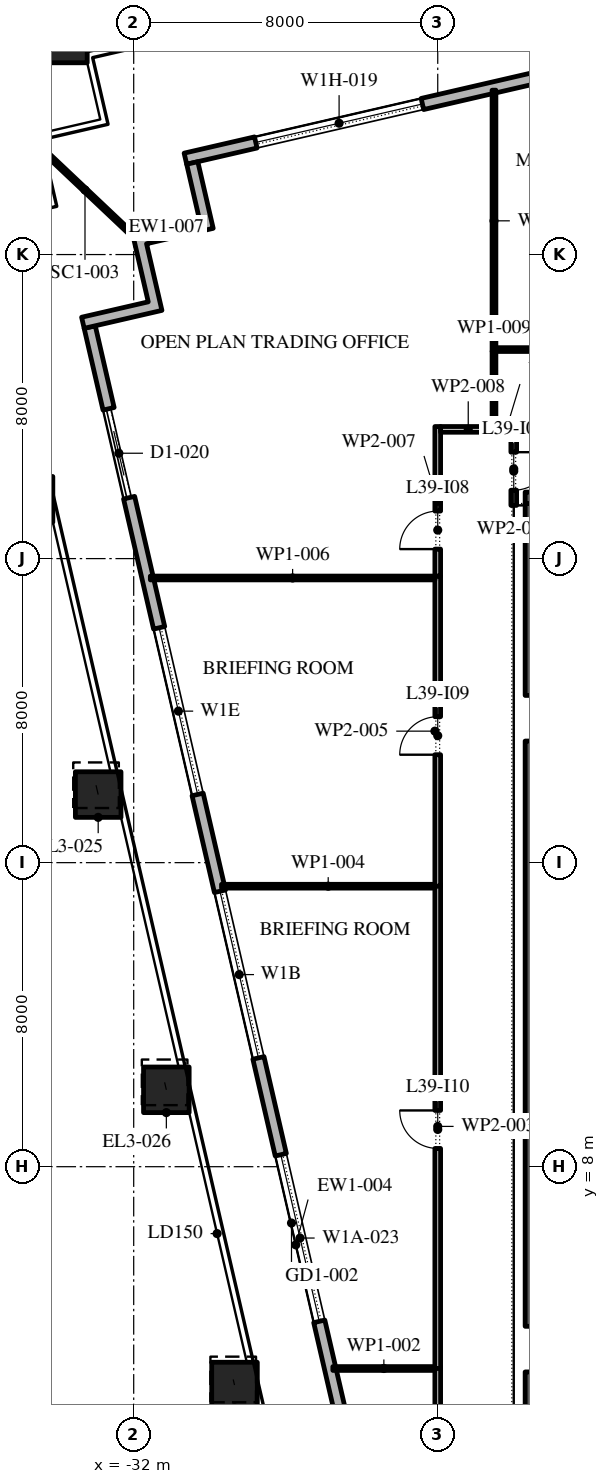
"""IFC4 building model, lengths in metres.
Left out: names, types, materials, properties, quantities, classifications, styles, units other than length and angle.
Written with IfcOpenShell. Run it as: python <this file> out.ifc"""

import sys

from ifc_helpers import new_model, si_unit, direction, frame, frame_2d, origin, origin_2d, place, context, subcontext, project, spatial, polyline, rectangle, outline, extrude, element, fill, save


model = new_model("IFC4")
c1 = context("Model", 3, precision=1e-05, world=origin(), true_north=direction((0.0, 1.0)))
c2 = subcontext(c1, "Body", "Model", "MODEL_VIEW")
j1 = project(units=[si_unit("LENGTHUNIT", "METRE"), si_unit("PLANEANGLEUNIT", "RADIAN")], contexts=[c1])
p1 = place(None, origin())
s1 = spatial("IfcSite", under=j1, at=p1, CompositionType="ELEMENT")
p2 = place(p1, origin())
s2 = spatial("IfcBuilding", under=s1, at=p2, CompositionType="ELEMENT")
p3 = place(p2, frame((0.0, 0.0, 180.0)))
s3 = spatial("IfcBuildingStorey", under=s2, at=p3, CompositionType="ELEMENT", Elevation=180.0)
p4 = place(p3, frame((-33.823, 37.646, 0.0), z_axis=(-0.018825755928, 0.08155896722, 0.996490705315), x_axis=(-0.974379530941, -0.22491004798, 0.0)))
e1 = element("IfcColumn", 1, at=p4, inside=s3, PredefinedType="COLUMN", context=c2, shape_type="SweptSolid", body=[
    extrude(rectangle(XDim=1.2, YDim=1.2, at=origin_2d()), origin(), (0.0, 0.0, 1.0), 4.215),
])
p5 = place(p3, frame((-34.728, 25.56, 0.0), z_axis=(-0.016176212764, 0.069980963462, 0.99741716192), x_axis=(-0.974309502923, -0.225213215672, 0.0)))
e2 = element("IfcColumn", 2, at=p5, inside=s3, PredefinedType="COLUMN", context=c2, shape_type="SweptSolid", body=[
    extrude(rectangle(XDim=1.2, YDim=1.2, at=origin_2d()), origin(), (0.0, 0.0, 1.0), 4.211),
])
p6 = place(p3, frame((-32.934, 17.791, 0.0), z_axis=(-0.013519768466, 0.058430930665, 0.998199900923), x_axis=(-0.974260583886, -0.225424742845, 0.0)))
e3 = element("IfcColumn", 3, at=p6, inside=s3, PredefinedType="COLUMN", context=c2, shape_type="SweptSolid", body=[
    extrude(rectangle(XDim=1.2, YDim=1.2, at=origin_2d()), origin(), (0.0, 0.0, 1.0), 4.208),
])
p7 = place(p3, frame((-31.141, 10.023, 0.0), z_axis=(-0.010799619665, 0.046740289408, 0.998848694028), x_axis=(-0.974329962248, -0.225124686929, 0.0)))
e4 = element("IfcColumn", 4, at=p7, inside=s3, PredefinedType="COLUMN", context=c2, shape_type="SweptSolid", body=[
    extrude(rectangle(XDim=1.2, YDim=1.2, at=origin_2d()), origin(), (0.0, 0.0, 1.0), 4.205),
])
p8 = place(p3, frame((-29.347, 2.254, 0.0), z_axis=(-0.008074763646, 0.035029370347, 0.999353661826), x_axis=(-0.974445638882, -0.224623455729, 0.0)))
e5 = element("IfcColumn", 5, at=p8, inside=s3, PredefinedType="COLUMN", context=c2, shape_type="SweptSolid", body=[
    extrude(rectangle(XDim=1.2, YDim=1.2, at=origin_2d()), origin(), (0.0, 0.0, 1.0), 4.203),
])
p9 = place(p3, frame((17.592, 45.657, 0.0), z_axis=(0.0, 0.0, 1.0), x_axis=(-0.974370243697, -0.224950279389, 0.0)))
e6 = element("IfcWall", 6, at=p9, inside=s3, PredefinedType="STANDARD", context=c2, shape_type="SweptSolid", body=[
    extrude(rectangle(XDim=49.5, YDim=0.3, at=frame_2d((24.75, 0.0))), origin(), (0.0, 0.0, 1.0), 4.0),
])
p10 = place(p9, frame((2.8, 0.0, 0.0)))
e7 = element("IfcOpeningElement", 7, at=p10, cuts=e6, PredefinedType="OPENING", context=c2, shape_type="SweptSolid", body=[
    extrude(rectangle(XDim=2.4, YDim=3.5, at=frame_2d((1.2, 1.75))), frame((0.0, 0.16, 0.0), z_axis=(0.0, -1.0, 0.0), x_axis=(1.0, 0.0, 0.0)), (0.0, 0.0, 1.0), 0.32),
])
p11 = place(p9, frame((9.9, 0.0, 0.45)))
e8 = element("IfcOpeningElement", 8, at=p11, cuts=e6, PredefinedType="OPENING", context=c2, shape_type="SweptSolid", body=[
    extrude(rectangle(XDim=4.5, YDim=2.45, at=frame_2d((2.25, 1.225))), frame((0.0, 0.16, 0.0), z_axis=(0.0, -1.0, 0.0), x_axis=(1.0, 0.0, 0.0)), (0.0, 0.0, 1.0), 0.32),
])
p12 = place(p9, frame((18.2, 0.0, 0.45)))
e9 = element("IfcOpeningElement", 9, at=p12, cuts=e6, PredefinedType="OPENING", context=c2, shape_type="SweptSolid", body=[
    extrude(rectangle(XDim=4.5, YDim=2.45, at=frame_2d((2.25, 1.225))), frame((0.0, 0.16, 0.0), z_axis=(0.0, -1.0, 0.0), x_axis=(1.0, 0.0, 0.0)), (0.0, 0.0, 1.0), 0.32),
])
p13 = place(p9, frame((26.5, 0.0, 0.45)))
e10 = element("IfcOpeningElement", 10, at=p13, cuts=e6, PredefinedType="OPENING", context=c2, shape_type="SweptSolid", body=[
    extrude(rectangle(XDim=4.5, YDim=2.575, at=frame_2d((2.25, 1.288))), frame((0.0, 0.16, 0.0), z_axis=(0.0, -1.0, 0.0), x_axis=(1.0, 0.0, 0.0)), (0.0, 0.0, 1.0), 0.32),
])
p14 = place(p9, frame((35.85, 0.0, 0.0)))
e11 = element("IfcOpeningElement", 11, at=p14, cuts=e6, PredefinedType="OPENING", context=c2, shape_type="SweptSolid", body=[
    extrude(rectangle(XDim=2.4, YDim=3.5, at=frame_2d((1.2, 1.75))), frame((0.0, 0.16, 0.0), z_axis=(0.0, -1.0, 0.0), x_axis=(1.0, 0.0, 0.0)), (0.0, 0.0, 1.0), 0.32),
])
p15 = place(p9, frame((43.1, 0.0, 0.45)))
e12 = element("IfcOpeningElement", 12, at=p15, cuts=e6, PredefinedType="OPENING", context=c2, shape_type="SweptSolid", body=[
    extrude(rectangle(XDim=4.5, YDim=2.75, at=frame_2d((2.25, 1.375))), frame((0.0, 0.16, 0.0), z_axis=(0.0, -1.0, 0.0), x_axis=(1.0, 0.0, 0.0)), (0.0, 0.0, 1.0), 0.32),
])
p16 = place(p3, frame((-33.157, 30.092, 0.0), z_axis=(0.0, 0.0, 1.0), x_axis=(0.224950279389, -0.974370243697, 0.0)))
e13 = element("IfcWall", 13, at=p16, inside=s3, PredefinedType="STANDARD", context=c2, shape_type="SweptSolid", body=[
    extrude(rectangle(XDim=49.5, YDim=0.3, at=frame_2d((24.75, 0.0))), origin(), (0.0, 0.0, 1.0), 4.0),
])
p17 = place(p16, frame((2.207, 0.0, 0.0)))
e14 = element("IfcOpeningElement", 14, at=p17, cuts=e13, PredefinedType="OPENING", context=c2, shape_type="SweptSolid", body=[
    extrude(rectangle(XDim=2.4, YDim=3.5, at=frame_2d((1.2, 1.75))), frame((0.0, 0.16, 0.0), z_axis=(0.0, -1.0, 0.0), x_axis=(1.0, 0.0, 0.0)), (0.0, 0.0, 1.0), 0.32),
])
p18 = place(p16, frame((8.121, 0.0, 0.45)))
e15 = element("IfcOpeningElement", 15, at=p18, cuts=e13, PredefinedType="OPENING", context=c2, shape_type="SweptSolid", body=[
    extrude(rectangle(XDim=4.5, YDim=2.825, at=frame_2d((2.25, 1.413))), frame((0.0, 0.16, 0.0), z_axis=(0.0, -1.0, 0.0), x_axis=(1.0, 0.0, 0.0)), (0.0, 0.0, 1.0), 0.32),
])
p19 = place(p16, frame((15.236, 0.0, 0.45)))
e16 = element("IfcOpeningElement", 16, at=p19, cuts=e13, PredefinedType="OPENING", context=c2, shape_type="SweptSolid", body=[
    extrude(rectangle(XDim=4.5, YDim=2.95, at=frame_2d((2.25, 1.475))), frame((0.0, 0.16, 0.0), z_axis=(0.0, -1.0, 0.0), x_axis=(1.0, 0.0, 0.0)), (0.0, 0.0, 1.0), 0.32),
])
p20 = place(p16, frame((22.35, 0.0, 0.45)))
e17 = element("IfcOpeningElement", 17, at=p20, cuts=e13, PredefinedType="OPENING", context=c2, shape_type="SweptSolid", body=[
    extrude(rectangle(XDim=4.5, YDim=3.0, at=frame_2d((2.25, 1.5))), frame((0.0, 0.16, 0.0), z_axis=(0.0, -1.0, 0.0), x_axis=(1.0, 0.0, 0.0)), (0.0, 0.0, 1.0), 0.32),
])
p21 = place(p16, frame((30.514, 0.0, 0.0)))
e18 = element("IfcOpeningElement", 18, at=p21, cuts=e13, PredefinedType="OPENING", context=c2, shape_type="SweptSolid", body=[
    extrude(rectangle(XDim=2.4, YDim=3.5, at=frame_2d((1.2, 1.75))), frame((0.0, 0.16, 0.0), z_axis=(0.0, -1.0, 0.0), x_axis=(1.0, 0.0, 0.0)), (0.0, 0.0, 1.0), 0.32),
])
p22 = place(p16, frame((36.579, 0.0, 0.45)))
e19 = element("IfcOpeningElement", 19, at=p22, cuts=e13, PredefinedType="OPENING", context=c2, shape_type="SweptSolid", body=[
    extrude(rectangle(XDim=4.5, YDim=3.05, at=frame_2d((2.25, 1.525))), frame((0.0, 0.16, 0.0), z_axis=(0.0, -1.0, 0.0), x_axis=(1.0, 0.0, 0.0)), (0.0, 0.0, 1.0), 0.32),
])
p23 = place(p16, frame((43.693, 0.0, 0.45)))
e20 = element("IfcOpeningElement", 20, at=p23, cuts=e13, PredefinedType="OPENING", context=c2, shape_type="SweptSolid", body=[
    extrude(rectangle(XDim=4.5, YDim=3.05, at=frame_2d((2.25, 1.525))), frame((0.0, 0.16, 0.0), z_axis=(0.0, -1.0, 0.0), x_axis=(1.0, 0.0, 0.0)), (0.0, 0.0, 1.0), 0.32),
])
p24 = place(p3, origin())
e21 = element("IfcWall", 21, at=p24, inside=s3, PredefinedType="STANDARD", context=c2, shape_type="SweptSolid", body=[
    extrude(outline(polyline([(-31.617, 30.756), (-32.022, 32.51), (-30.268, 32.914), (-30.605, 34.376), (-30.313, 34.443), (-29.908, 32.69), (-31.662, 32.285), (-31.257, 30.531), (-33.303, 30.058), (-33.371, 30.351), (-31.617, 30.756)])), origin(), (0.0, 0.0, 1.0), 4.0),
])
p25 = place(p3, frame((-32.022, 32.51, -0.05), z_axis=(0.0, 0.0, 1.0), x_axis=(-0.726757236711, 0.686894401555, 0.0)))
e22 = element("IfcWall", 22, at=p25, inside=s3, PredefinedType="STANDARD", context=c2, shape_type="SweptSolid", body=[
    extrude(rectangle(XDim=3.467, YDim=0.1, at=frame_2d((1.733, 0.0))), origin(), (0.0, 0.0, 1.0), 4.05),
])
p26 = place(p3, frame((-21.35, -2.45, 0.0), z_axis=(0.0, 0.0, 1.0), x_axis=(0.0, 1.0, 0.0)))
e23 = element("IfcWall", 23, at=p26, inside=s3, PredefinedType="SHEAR", context=c2, shape_type="SweptSolid", body=[
    extrude(rectangle(XDim=27.9, YDim=0.7, at=frame_2d((13.95, 0.0))), origin(), (0.0, 0.0, 1.0), 4.0),
])
p27 = place(p26, frame((5.05, 0.0, 0.0)))
e24 = element("IfcOpeningElement", 24, at=p27, cuts=e23, PredefinedType="OPENING", context=c2, shape_type="SweptSolid", body=[
    extrude(rectangle(XDim=1.2, YDim=2.1, at=frame_2d((0.6, 1.05))), frame((0.0, 0.36, 0.0), z_axis=(0.0, -1.0, 0.0), x_axis=(1.0, 0.0, 0.0)), (0.0, 0.0, 1.0), 0.72),
])
p28 = place(p26, frame((21.65, 0.0, 0.0)))
e25 = element("IfcOpeningElement", 25, at=p28, cuts=e23, PredefinedType="OPENING", context=c2, shape_type="SweptSolid", body=[
    extrude(rectangle(XDim=1.2, YDim=2.1, at=frame_2d((0.6, 1.05))), frame((0.0, 0.36, 0.0), z_axis=(0.0, -1.0, 0.0), x_axis=(1.0, 0.0, 0.0)), (0.0, 0.0, 1.0), 0.72),
])
p29 = place(p3, frame((-21.7, 25.6, 0.0), z_axis=(0.0, 0.0, 1.0), x_axis=(1.0, 0.0, 0.0)))
e26 = element("IfcWall", 26, at=p29, inside=s3, PredefinedType="SHEAR", context=c2, shape_type="SweptSolid", body=[
    extrude(rectangle(XDim=11.4, YDim=0.3, at=frame_2d((5.7, 0.0))), origin(), (0.0, 0.0, 1.0), 4.0),
])
p30 = place(p3, frame((-24.0, -5.075, 0.0), z_axis=(0.0, 0.0, 1.0), x_axis=(0.0, 1.0, 0.0)))
e27 = element("IfcWall", 27, at=p30, inside=s3, PredefinedType="PARTITIONING", context=c2, shape_type="SweptSolid", body=[
    extrude(rectangle(XDim=7.815, YDim=0.15, at=frame_2d((3.907, 0.0))), origin(), (0.0, 0.0, 1.0), 4.0),
])
p31 = place(p3, frame((-24.075, 2.69, 0.0), z_axis=(0.0, 0.0, 1.0), x_axis=(-1.0, 0.0, 0.0)))
e28 = element("IfcWall", 28, at=p31, inside=s3, PredefinedType="PARTITIONING", context=c2, shape_type="SweptSolid", body=[
    extrude(rectangle(XDim=2.685, YDim=0.1, at=frame_2d((1.343, 0.0))), origin(), (0.0, 0.0, 1.0), 4.0),
])
p32 = place(p3, frame((-24.0, 2.69, 0.0), z_axis=(0.0, 0.0, 1.0), x_axis=(0.0, 1.0, 0.0)))
e29 = element("IfcWall", 29, at=p32, inside=s3, PredefinedType="PARTITIONING", context=c2, shape_type="SweptSolid", body=[
    extrude(rectangle(XDim=12.74, YDim=0.15, at=frame_2d((6.37, 0.0))), origin(), (0.0, 0.0, 1.0), 4.0),
])
p33 = place(p32, frame((5.79, 0.0, 0.0)))
e30 = element("IfcOpeningElement", 30, at=p33, cuts=e29, PredefinedType="OPENING", context=c2, shape_type="SweptSolid", body=[
    extrude(rectangle(XDim=1.0, YDim=2.1, at=frame_2d((0.5, 1.05))), frame((0.0, 0.085, 0.0), z_axis=(0.0, -1.0, 0.0), x_axis=(1.0, 0.0, 0.0)), (0.0, 0.0, 1.0), 0.17),
])
p34 = place(p3, frame((-24.075, 15.38, 0.0), z_axis=(0.0, 0.0, 1.0), x_axis=(-1.0, 0.0, 0.0)))
e31 = element("IfcWall", 31, at=p34, inside=s3, PredefinedType="PARTITIONING", context=c2, shape_type="SweptSolid", body=[
    extrude(rectangle(XDim=5.614, YDim=0.1, at=frame_2d((2.807, 0.0))), origin(), (0.0, 0.0, 1.0), 4.0),
])
p35 = place(p3, frame((-24.0, 15.38, 0.0), z_axis=(0.0, 0.0, 1.0), x_axis=(0.0, 1.0, 0.0)))
e32 = element("IfcWall", 32, at=p35, inside=s3, PredefinedType="PARTITIONING", context=c2, shape_type="SweptSolid", body=[
    extrude(rectangle(XDim=8.16, YDim=0.15, at=frame_2d((4.08, 0.0))), origin(), (0.0, 0.0, 1.0), 4.0),
])
p36 = place(p35, frame((3.46, 0.0, 0.0)))
e33 = element("IfcOpeningElement", 33, at=p36, cuts=e32, PredefinedType="OPENING", context=c2, shape_type="SweptSolid", body=[
    extrude(rectangle(XDim=1.0, YDim=2.1, at=frame_2d((0.5, 1.05))), frame((0.0, 0.085, 0.0), z_axis=(0.0, -1.0, 0.0), x_axis=(1.0, 0.0, 0.0)), (0.0, 0.0, 1.0), 0.17),
])
p37 = place(p3, frame((-24.075, 23.49, 0.0), z_axis=(0.0, 0.0, 1.0), x_axis=(-1.0, 0.0, 0.0)))
e34 = element("IfcWall", 34, at=p37, inside=s3, PredefinedType="PARTITIONING", context=c2, shape_type="SweptSolid", body=[
    extrude(rectangle(XDim=7.487, YDim=0.1, at=frame_2d((3.744, 0.0))), origin(), (0.0, 0.0, 1.0), 4.0),
])
p38 = place(p3, frame((-24.0, 23.54, 0.0), z_axis=(0.0, 0.0, 1.0), x_axis=(0.0, 1.0, 0.0)))
e35 = element("IfcWall", 35, at=p38, inside=s3, PredefinedType="PARTITIONING", context=c2, shape_type="SweptSolid", body=[
    extrude(rectangle(XDim=3.935, YDim=0.15, at=frame_2d((1.968, 0.0))), origin(), (0.0, 0.0, 1.0), 4.0),
])
p39 = place(p38, frame((0.71, 0.0, 0.0)))
e36 = element("IfcOpeningElement", 36, at=p39, cuts=e35, PredefinedType="OPENING", context=c2, shape_type="SweptSolid", body=[
    extrude(rectangle(XDim=1.0, YDim=2.1, at=frame_2d((0.5, 1.05))), frame((0.0, 0.085, 0.0), z_axis=(0.0, -1.0, 0.0), x_axis=(1.0, 0.0, 0.0)), (0.0, 0.0, 1.0), 0.17),
])
p40 = place(p3, frame((-23.925, 27.4, 0.0), z_axis=(0.0, 0.0, 1.0), x_axis=(1.0, 0.0, 0.0)))
e37 = element("IfcWall", 37, at=p40, inside=s3, PredefinedType="PARTITIONING", context=c2, shape_type="SweptSolid", body=[
    extrude(rectangle(XDim=1.455, YDim=0.15, at=frame_2d((0.728, 0.0))), origin(), (0.0, 0.0, 1.0), 4.0),
])
p41 = place(p3, frame((-22.52, 27.475, 0.0), z_axis=(0.0, 0.0, 1.0), x_axis=(0.0, 1.0, 0.0)))
e38 = element("IfcWall", 38, at=p41, inside=s3, PredefinedType="PARTITIONING", context=c2, shape_type="SweptSolid", body=[
    extrude(rectangle(XDim=1.975, YDim=0.1, at=frame_2d((0.987, 0.0))), origin(), (0.0, 0.0, 1.0), 4.0),
])
p42 = place(p3, frame((-22.47, 27.4, 0.0), z_axis=(0.0, 0.0, 1.0), x_axis=(1.0, 0.0, 0.0)))
e39 = element("IfcWall", 39, at=p42, inside=s3, PredefinedType="PARTITIONING", context=c2, shape_type="SweptSolid", body=[
    extrude(rectangle(XDim=0.545, YDim=0.15, at=frame_2d((0.272, 0.0))), origin(), (0.0, 0.0, 1.0), 4.0),
])
p43 = place(p3, frame((-22.52, 29.45, 0.0), z_axis=(0.0, 0.0, 1.0), x_axis=(0.0, 1.0, 0.0)))
e40 = element("IfcWall", 40, at=p43, inside=s3, PredefinedType="PARTITIONING", context=c2, shape_type="SweptSolid", body=[
    extrude(rectangle(XDim=6.875, YDim=0.1, at=frame_2d((3.438, 0.0))), origin(), (0.0, 0.0, 1.0), 4.0),
])
p44 = place(p3, frame((-22.47, 29.5, 0.0), z_axis=(0.0, 0.0, 1.0), x_axis=(1.0, 0.0, 0.0)))
e41 = element("IfcWall", 41, at=p44, inside=s3, PredefinedType="PARTITIONING", context=c2, shape_type="SweptSolid", body=[
    extrude(rectangle(XDim=8.09, YDim=0.1, at=frame_2d((4.045, 0.0))), origin(), (0.0, 0.0, 1.0), 4.0),
])
p45 = place(p44, frame((3.44, 0.0, 0.0)))
e42 = element("IfcOpeningElement", 42, at=p45, cuts=e41, PredefinedType="OPENING", context=c2, shape_type="SweptSolid", body=[
    extrude(rectangle(XDim=0.9, YDim=2.1, at=frame_2d((0.45, 1.05))), frame((0.0, 0.06, 0.0), z_axis=(0.0, -1.0, 0.0), x_axis=(1.0, 0.0, 0.0)), (0.0, 0.0, 1.0), 0.12),
])
p46 = place(p3, frame((-22.0, 27.325, 0.0), z_axis=(0.0, 0.0, 1.0), x_axis=(0.0, -1.0, 0.0)))
e43 = element("IfcWall", 43, at=p46, inside=s3, PredefinedType="PARTITIONING", context=c2, shape_type="SweptSolid", body=[
    extrude(rectangle(XDim=1.925, YDim=0.15, at=frame_2d((0.962, 0.0))), origin(), (0.0, 0.0, 1.0), 4.0),
])
p47 = place(p46, frame((0.525, 0.0, 0.0)))
e44 = element("IfcOpeningElement", 44, at=p47, cuts=e43, PredefinedType="OPENING", context=c2, shape_type="SweptSolid", body=[
    extrude(rectangle(XDim=1.0, YDim=2.1, at=frame_2d((0.5, 1.05))), frame((0.0, 0.085, 0.0), z_axis=(0.0, -1.0, 0.0), x_axis=(1.0, 0.0, 0.0)), (0.0, 0.0, 1.0), 0.17),
])
p48 = place(p15, origin())
e45 = element("IfcWindow", 45, at=p48, inside=s3, PartitioningType="DOUBLE_PANEL_VERTICAL", PredefinedType="WINDOW", context=c2, shape_type="SweptSolid", body=[
    extrude(rectangle(XDim=4.5, YDim=2.75, at=frame_2d((2.25, 1.375))), frame((0.0, 0.03, 0.0), z_axis=(0.0, -1.0, 0.0), x_axis=(1.0, 0.0, 0.0)), (0.0, 0.0, 1.0), 0.06),
])
fill(e12, e45)
p49 = place(p17, origin())
e46 = element("IfcDoor", 46, at=p49, inside=s3, OperationType="DOUBLE_DOOR_SLIDING", PredefinedType="DOOR", context=c2, shape_type="SweptSolid", body=[
    extrude(rectangle(XDim=2.4, YDim=3.5, at=frame_2d((1.2, 1.75))), frame((0.0, 0.025, 0.0), z_axis=(0.0, -1.0, 0.0), x_axis=(1.0, 0.0, 0.0)), (0.0, 0.0, 1.0), 0.05),
])
fill(e14, e46)
p50 = place(p18, origin())
e47 = element("IfcWindow", 47, at=p50, inside=s3, PartitioningType="DOUBLE_PANEL_VERTICAL", PredefinedType="WINDOW", context=c2, shape_type="SweptSolid", body=[
    extrude(rectangle(XDim=4.5, YDim=2.825, at=frame_2d((2.25, 1.413))), frame((0.0, 0.03, 0.0), z_axis=(0.0, -1.0, 0.0), x_axis=(1.0, 0.0, 0.0)), (0.0, 0.0, 1.0), 0.06),
])
fill(e15, e47)
p51 = place(p19, origin())
e48 = element("IfcWindow", 48, at=p51, inside=s3, PartitioningType="DOUBLE_PANEL_VERTICAL", PredefinedType="WINDOW", context=c2, shape_type="SweptSolid", body=[
    extrude(rectangle(XDim=4.5, YDim=2.95, at=frame_2d((2.25, 1.475))), frame((0.0, 0.03, 0.0), z_axis=(0.0, -1.0, 0.0), x_axis=(1.0, 0.0, 0.0)), (0.0, 0.0, 1.0), 0.06),
])
fill(e16, e48)
p52 = place(p20, origin())
e49 = element("IfcWindow", 49, at=p52, inside=s3, PartitioningType="DOUBLE_PANEL_VERTICAL", PredefinedType="WINDOW", context=c2, shape_type="SweptSolid", body=[
    extrude(rectangle(XDim=4.5, YDim=3.0, at=frame_2d((2.25, 1.5))), frame((0.0, 0.03, 0.0), z_axis=(0.0, -1.0, 0.0), x_axis=(1.0, 0.0, 0.0)), (0.0, 0.0, 1.0), 0.06),
])
fill(e17, e49)
p53 = place(p47, origin())
e50 = element("IfcDoor", 50, at=p53, inside=s3, OperationType="SINGLE_SWING_RIGHT", PredefinedType="DOOR", context=c2, shape_type="SweptSolid", body=[
    extrude(rectangle(XDim=1.0, YDim=2.1, at=frame_2d((0.5, 1.05))), frame((0.0, 0.025, 0.0), z_axis=(0.0, -1.0, 0.0), x_axis=(1.0, 0.0, 0.0)), (0.0, 0.0, 1.0), 0.05),
])
fill(e44, e50)
p54 = place(p39, origin())
e51 = element("IfcDoor", 51, at=p54, inside=s3, OperationType="SINGLE_SWING_RIGHT", PredefinedType="DOOR", context=c2, shape_type="SweptSolid", body=[
    extrude(rectangle(XDim=1.0, YDim=2.1, at=frame_2d((0.5, 1.05))), frame((0.0, 0.025, 0.0), z_axis=(0.0, -1.0, 0.0), x_axis=(1.0, 0.0, 0.0)), (0.0, 0.0, 1.0), 0.05),
])
fill(e36, e51)
p55 = place(p36, origin())
e52 = element("IfcDoor", 52, at=p55, inside=s3, OperationType="SINGLE_SWING_RIGHT", PredefinedType="DOOR", context=c2, shape_type="SweptSolid", body=[
    extrude(rectangle(XDim=1.0, YDim=2.1, at=frame_2d((0.5, 1.05))), frame((0.0, 0.025, 0.0), z_axis=(0.0, -1.0, 0.0), x_axis=(1.0, 0.0, 0.0)), (0.0, 0.0, 1.0), 0.05),
])
fill(e33, e52)
p56 = place(p33, origin())
e53 = element("IfcDoor", 53, at=p56, inside=s3, OperationType="SINGLE_SWING_LEFT", PredefinedType="DOOR", context=c2, shape_type="SweptSolid", body=[
    extrude(rectangle(XDim=1.0, YDim=2.1, at=frame_2d((0.5, 1.05))), frame((0.0, 0.025, 0.0), z_axis=(0.0, -1.0, 0.0), x_axis=(1.0, 0.0, 0.0)), (0.0, 0.0, 1.0), 0.05),
])
fill(e30, e53)
save(model, sys.argv[1])
